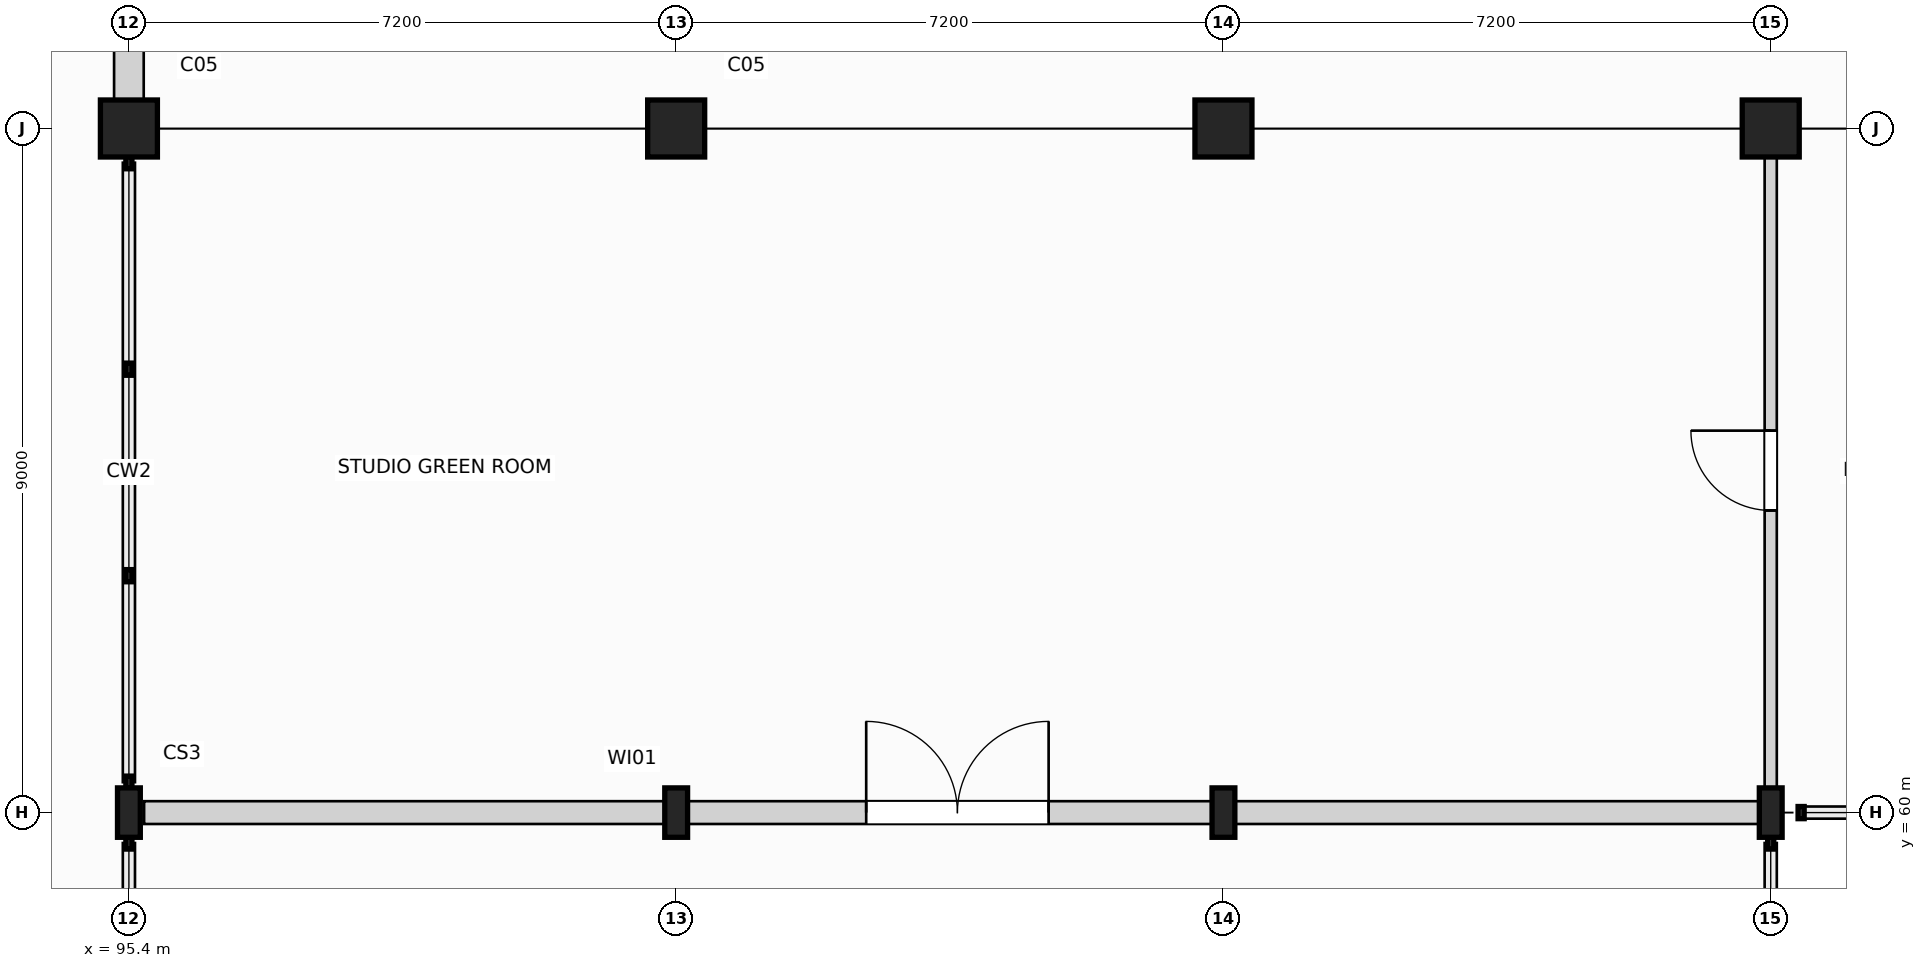
"""IFC4 building model, lengths in metres.
Left out: names, types, materials, properties, quantities, classifications, styles, units other than length and angle.
Written with IfcOpenShell. Run it as: python <this file> out.ifc"""

import sys

from ifc_helpers import new_model, si_unit, direction, frame, frame_2d, origin, origin_2d, place, context, subcontext, project, spatial, rectangle, i_section, extrude, element, fill, save


model = new_model("IFC4")
c1 = context("Model", 3, precision=1e-05, world=origin(), true_north=direction((0.0, 1.0)))
c2 = subcontext(c1, "Body", "Model", "MODEL_VIEW")
j1 = project(units=[si_unit("LENGTHUNIT", "METRE"), si_unit("PLANEANGLEUNIT", "RADIAN")], contexts=[c1])
p1 = place(None, origin())
s1 = spatial("IfcSite", under=j1, at=p1, CompositionType="ELEMENT")
p2 = place(p1, origin())
s2 = spatial("IfcBuilding", under=s1, at=p2, CompositionType="ELEMENT")
p3 = place(p2, origin())
s3 = spatial("IfcBuildingStorey", under=s2, at=p3, CompositionType="ELEMENT", Elevation=0.0)
p4 = place(p3, frame((95.4, 60.0, 0.0), z_axis=(0.0, 0.0, 1.0), x_axis=(1.0, 0.0, 0.0)))
e1 = element("IfcColumn", 1, at=p4, inside=s3, PredefinedType="COLUMN", context=c2, shape_type="SweptSolid", body=[
    extrude(i_section(OverallWidth=0.3, OverallDepth=0.65, WebThickness=0.016, FlangeThickness=0.031, at=origin_2d()), origin(), (0.0, 0.0, 1.0), 6.0),
])
p5 = place(p3, frame((95.4, 69.0, 0.0), z_axis=(0.0, 0.0, 1.0), x_axis=(1.0, 0.0, 0.0)))
e2 = element("IfcColumn", 2, at=p5, inside=s3, PredefinedType="COLUMN", context=c2, shape_type="SweptSolid", body=[
    extrude(rectangle(XDim=0.75, YDim=0.75, at=origin_2d()), origin(), (0.0, 0.0, 1.0), 6.0),
])
p6 = place(p3, frame((102.6, 60.0, 0.0), z_axis=(0.0, 0.0, 1.0), x_axis=(1.0, 0.0, 0.0)))
e3 = element("IfcColumn", 3, at=p6, inside=s3, PredefinedType="COLUMN", context=c2, shape_type="SweptSolid", body=[
    extrude(i_section(OverallWidth=0.3, OverallDepth=0.65, WebThickness=0.016, FlangeThickness=0.031, at=origin_2d()), origin(), (0.0, 0.0, 1.0), 6.0),
])
p7 = place(p3, frame((102.6, 69.0, 0.0), z_axis=(0.0, 0.0, 1.0), x_axis=(1.0, 0.0, 0.0)))
e4 = element("IfcColumn", 4, at=p7, inside=s3, PredefinedType="COLUMN", context=c2, shape_type="SweptSolid", body=[
    extrude(rectangle(XDim=0.75, YDim=0.75, at=origin_2d()), origin(), (0.0, 0.0, 1.0), 6.0),
])
p8 = place(p3, frame((109.8, 60.0, 0.0), z_axis=(0.0, 0.0, 1.0), x_axis=(1.0, 0.0, 0.0)))
e5 = element("IfcColumn", 5, at=p8, inside=s3, PredefinedType="COLUMN", context=c2, shape_type="SweptSolid", body=[
    extrude(i_section(OverallWidth=0.3, OverallDepth=0.65, WebThickness=0.016, FlangeThickness=0.031, at=origin_2d()), origin(), (0.0, 0.0, 1.0), 6.0),
])
p9 = place(p3, frame((109.8, 69.0, 0.0), z_axis=(0.0, 0.0, 1.0), x_axis=(1.0, 0.0, 0.0)))
e6 = element("IfcColumn", 6, at=p9, inside=s3, PredefinedType="COLUMN", context=c2, shape_type="SweptSolid", body=[
    extrude(rectangle(XDim=0.75, YDim=0.75, at=origin_2d()), origin(), (0.0, 0.0, 1.0), 6.0),
])
p10 = place(p3, frame((117.0, 60.0, 0.0), z_axis=(0.0, 0.0, 1.0), x_axis=(1.0, 0.0, 0.0)))
e7 = element("IfcColumn", 7, at=p10, inside=s3, PredefinedType="COLUMN", context=c2, shape_type="SweptSolid", body=[
    extrude(i_section(OverallWidth=0.3, OverallDepth=0.65, WebThickness=0.016, FlangeThickness=0.031, at=origin_2d()), origin(), (0.0, 0.0, 1.0), 6.0),
])
p11 = place(p3, frame((117.0, 69.0, 0.0), z_axis=(0.0, 0.0, 1.0), x_axis=(1.0, 0.0, 0.0)))
e8 = element("IfcColumn", 8, at=p11, inside=s3, PredefinedType="COLUMN", context=c2, shape_type="SweptSolid", body=[
    extrude(rectangle(XDim=0.75, YDim=0.75, at=origin_2d()), origin(), (0.0, 0.0, 1.0), 6.0),
])
p12 = place(p3, frame((95.4, 77.63, 0.0), z_axis=(0.0, 0.0, 1.0), x_axis=(0.0, -1.0, 0.0)))
e9 = element("IfcWall", 9, at=p12, inside=s3, PredefinedType="SOLIDWALL", context=c2, shape_type="SweptSolid", body=[
    extrude(rectangle(XDim=8.26, YDim=0.39, at=frame_2d((4.13, 0.0))), origin(), (0.0, 0.0, 1.0), 5.065),
])
p13 = place(p12, frame((3.08, 0.0, 0.9)))
e10 = element("IfcOpeningElement", 10, at=p13, cuts=e9, PredefinedType="OPENING", context=c2, shape_type="SweptSolid", body=[
    extrude(rectangle(XDim=2.1, YDim=2.5, at=frame_2d((1.05, 1.25))), frame((0.0, 0.205, 0.0), z_axis=(0.0, -1.0, 0.0), x_axis=(1.0, 0.0, 0.0)), (0.0, 0.0, 1.0), 0.41),
])
p14 = place(p3, frame((95.6, 60.0, 0.0), z_axis=(0.0, 0.0, 1.0), x_axis=(1.0, 0.0, 0.0)))
e11 = element("IfcWall", 11, at=p14, inside=s3, PredefinedType="PARTITIONING", context=c2, shape_type="SweptSolid", body=[
    extrude(rectangle(XDim=21.4, YDim=0.3, at=frame_2d((10.7, 0.0))), origin(), (0.0, 0.0, 1.0), 5.065),
])
p15 = place(p14, frame((9.5, 0.0, 0.0)))
e12 = element("IfcOpeningElement", 12, at=p15, cuts=e11, PredefinedType="OPENING", context=c2, shape_type="SweptSolid", body=[
    extrude(rectangle(XDim=2.4, YDim=2.65, at=frame_2d((1.2, 1.325))), frame((0.0, 0.16, 0.0), z_axis=(0.0, -1.0, 0.0), x_axis=(1.0, 0.0, 0.0)), (0.0, 0.0, 1.0), 0.32),
])
p16 = place(p3, frame((117.0, 60.0, 0.0), z_axis=(0.0, 0.0, 1.0), x_axis=(0.0, 1.0, 0.0)))
e13 = element("IfcWall", 13, at=p16, inside=s3, PredefinedType="PARTITIONING", context=c2, shape_type="SweptSolid", body=[
    extrude(rectangle(XDim=9.0, YDim=0.16, at=frame_2d((4.5, 0.0))), origin(), (0.0, 0.0, 1.0), 5.065),
])
p17 = place(p16, frame((3.975, 0.0, 0.0)))
e14 = element("IfcOpeningElement", 14, at=p17, cuts=e13, PredefinedType="OPENING", context=c2, shape_type="SweptSolid", body=[
    extrude(rectangle(XDim=1.05, YDim=2.12, at=frame_2d((0.525, 1.06))), frame((0.0, 0.09, 0.0), z_axis=(0.0, -1.0, 0.0), x_axis=(1.0, 0.0, 0.0)), (0.0, 0.0, 1.0), 0.18),
])
p18 = place(p15, origin())
e15 = element("IfcDoor", 15, at=p18, inside=s3, OperationType="DOUBLE_DOOR_SINGLE_SWING", PredefinedType="DOOR", context=c2, shape_type="SweptSolid", body=[
    extrude(rectangle(XDim=2.4, YDim=2.65, at=frame_2d((1.2, 1.325))), frame((0.0, 0.025, 0.0), z_axis=(0.0, -1.0, 0.0), x_axis=(1.0, 0.0, 0.0)), (0.0, 0.0, 1.0), 0.05),
])
fill(e12, e15)
p19 = place(p17, origin())
e16 = element("IfcDoor", 16, at=p19, inside=s3, OperationType="SINGLE_SWING_RIGHT", PredefinedType="DOOR", context=c2, shape_type="SweptSolid", body=[
    extrude(rectangle(XDim=1.05, YDim=2.12, at=frame_2d((0.525, 1.06))), frame((0.0, 0.025, 0.0), z_axis=(0.0, -1.0, 0.0), x_axis=(1.0, 0.0, 0.0)), (0.0, 0.0, 1.0), 0.05),
])
fill(e14, e16)
save(model, sys.argv[1])
